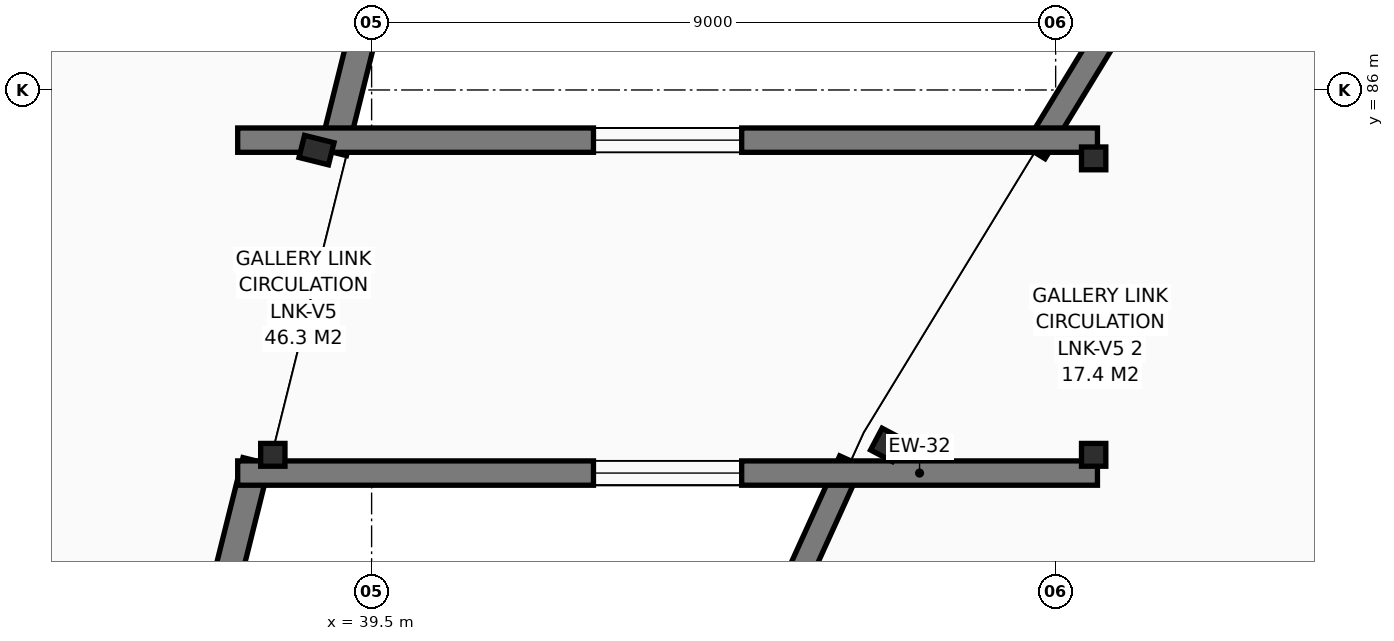
"""IFC4 building model, lengths in metres.
Left out: names, types, materials, properties, quantities, classifications, styles, units other than length and angle.
Written with IfcOpenShell. Run it as: python <this file> out.ifc"""

import sys

from ifc_helpers import new_model, si_unit, direction, frame, frame_2d, origin, origin_2d, place, context, subcontext, project, spatial, rectangle, hollow_circle, i_section, extrude, element, fill, save


model = new_model("IFC4")
c1 = context("Model", 3, precision=1e-05, world=origin(), true_north=direction((0.0, 1.0)))
c2 = subcontext(c1, "Body", "Model", "MODEL_VIEW")
j1 = project(units=[si_unit("LENGTHUNIT", "METRE"), si_unit("PLANEANGLEUNIT", "RADIAN")], contexts=[c1])
p1 = place(None, origin())
s1 = spatial("IfcSite", under=j1, at=p1, CompositionType="ELEMENT")
p2 = place(p1, origin())
s2 = spatial("IfcBuilding", under=s1, at=p2, CompositionType="ELEMENT")
p3 = place(p2, frame((0.0, 0.0, 5.1)))
s3 = spatial("IfcBuildingStorey", under=s2, at=p3, CompositionType="ELEMENT", Elevation=5.1)
p4 = place(p3, frame((46.284, 81.331, 0.0), z_axis=(0.0, 0.0, 1.0), x_axis=(0.883683947469, -0.468084053333, 0.0)))
e1 = element("IfcColumn", 1, at=p4, inside=s3, PredefinedType="COLUMN", context=c2, shape_type="SweptSolid", body=[
    extrude(hollow_circle(Radius=0.162, WallThickness=0.016, at=origin_2d()), origin(), (0.0, 0.0, 1.0), 4.42),
])
p5 = place(p3, frame((38.775, 85.209, 0.0), z_axis=(0.0, 0.0, 1.0), x_axis=(0.970295726276, -0.2419218956, 0.0)))
e2 = element("IfcColumn", 2, at=p5, inside=s3, PredefinedType="COLUMN", context=c2, shape_type="SweptSolid", body=[
    extrude(i_section(OverallWidth=0.3, OverallDepth=0.4, WebThickness=0.013, FlangeThickness=0.024, FilletRadius=0.027, at=origin_2d()), origin(), (0.0, 0.0, 1.0), 4.42),
])
for number, where, z_axis, x_axis in (
    (3, (38.2, 81.2, 0.0), (0.0, 0.0, 1.0), (1.0, 0.0, 0.0)),
    (4, (49.0, 81.2, 0.0), (0.0, 0.0, 1.0), (1.0, 0.0, 0.0)),
    (5, (49.0, 85.1, 0.0), (0.0, 0.0, 1.0), (1.0, 0.0, 0.0)),
):
    element("IfcColumn", number, at=place(p3, frame(where, z_axis=z_axis, x_axis=x_axis)), inside=s3, PredefinedType="COLUMN", context=c2, shape_type="SweptSolid", body=[
        extrude(i_section(OverallWidth=0.3, OverallDepth=0.32, WebThickness=0.011, FlangeThickness=0.021, FilletRadius=0.027, at=origin_2d()), origin(), (0.0, 0.0, 1.0), 4.42),
    ])
p6 = place(p3, frame((48.223, 85.18, 0.0), z_axis=(0.0, 0.0, 1.0), x_axis=(0.520931481082, 0.853598495792, 0.0)))
e6 = element("IfcWall", 6, at=p6, inside=s3, PredefinedType="SOLIDWALL", context=c2, shape_type="SweptSolid", body=[
    extrude(rectangle(XDim=2.572, YDim=0.32, at=frame_2d((1.286, 0.0))), origin(), (0.0, 0.0, 1.0), 4.18),
])
p7 = place(p3, frame((43.127, 75.222, 0.0), z_axis=(0.0, 0.0, 1.0), x_axis=(0.41336840626, 0.910563869647, 0.0)))
e7 = element("IfcWall", 7, at=p7, inside=s3, PredefinedType="SOLIDWALL", context=c2, shape_type="SweptSolid", body=[
    extrude(rectangle(XDim=6.477, YDim=0.32, at=frame_2d((3.239, 0.0))), origin(), (0.0, 0.0, 1.0), 4.18),
])
p8 = place(p3, frame((42.617, 99.71, 0.0), z_axis=(0.0, 0.0, 1.0), x_axis=(-0.241906463411, -0.970299573822, 0.0)))
e8 = element("IfcWall", 8, at=p8, inside=s3, PredefinedType="SOLIDWALL", context=c2, shape_type="SweptSolid", body=[
    extrude(rectangle(XDim=14.975, YDim=0.36, at=frame_2d((7.488, 0.0))), origin(), (0.0, 0.0, 1.0), 4.18),
])
p9 = place(p8, frame((1.6, 0.0, 0.85)))
e9 = element("IfcOpeningElement", 9, at=p9, cuts=e8, PredefinedType="OPENING", context=c2, shape_type="SweptSolid", body=[
    extrude(rectangle(XDim=1.5, YDim=1.7, at=frame_2d((0.75, 0.85))), frame((0.0, 0.19, 0.0), z_axis=(0.0, -1.0, 0.0), x_axis=(1.0, 0.0, 0.0)), (0.0, 0.0, 1.0), 0.38),
])
p10 = place(p3, frame((37.982, 81.12, 0.0), z_axis=(0.0, 0.0, 1.0), x_axis=(-0.241954977531, -0.970287477425, 0.0)))
e10 = element("IfcWall", 10, at=p10, inside=s3, PredefinedType="SOLIDWALL", context=c2, shape_type="SweptSolid", body=[
    extrude(rectangle(XDim=3.661, YDim=0.36, at=frame_2d((1.831, 0.0))), origin(), (0.0, 0.0, 1.0), 4.18),
])
p11 = place(p3, frame((37.271, 77.525, 0.0), z_axis=(0.0, 0.0, 1.0), x_axis=(-0.970297203556, 0.241915970475, 0.0)))
e11 = element("IfcWall", 11, at=p11, inside=s3, PredefinedType="SOLIDWALL", context=c2, shape_type="SweptSolid", body=[
    extrude(rectangle(XDim=32.82, YDim=0.36, at=frame_2d((16.41, 0.0))), origin(), (0.0, 0.0, 1.0), 4.18),
])
p12 = place(p11, frame((1.6, 0.0, 0.85)))
e12 = element("IfcOpeningElement", 12, at=p12, cuts=e11, PredefinedType="OPENING", context=c2, shape_type="SweptSolid", body=[
    extrude(rectangle(XDim=1.8, YDim=1.7, at=frame_2d((0.9, 0.85))), frame((0.0, 0.19, 0.0), z_axis=(0.0, -1.0, 0.0), x_axis=(1.0, 0.0, 0.0)), (0.0, 0.0, 1.0), 0.38),
])
p13 = place(p11, frame((13.448, 0.0, 0.85)))
e13 = element("IfcOpeningElement", 13, at=p13, cuts=e11, PredefinedType="OPENING", context=c2, shape_type="SweptSolid", body=[
    extrude(rectangle(XDim=1.95, YDim=1.5, at=frame_2d((0.975, 0.75))), frame((0.0, 0.19, 0.0), z_axis=(0.0, -1.0, 0.0), x_axis=(1.0, 0.0, 0.0)), (0.0, 0.0, 1.0), 0.38),
])
p14 = place(p11, frame((19.372, 0.0, 0.85)))
e14 = element("IfcOpeningElement", 14, at=p14, cuts=e11, PredefinedType="OPENING", context=c2, shape_type="SweptSolid", body=[
    extrude(rectangle(XDim=1.5, YDim=1.7, at=frame_2d((0.75, 0.85))), frame((0.0, 0.19, 0.0), z_axis=(0.0, -1.0, 0.0), x_axis=(1.0, 0.0, 0.0)), (0.0, 0.0, 1.0), 0.38),
])
p15 = place(p11, frame((25.296, 0.0, 0.85)))
e15 = element("IfcOpeningElement", 15, at=p15, cuts=e11, PredefinedType="OPENING", context=c2, shape_type="SweptSolid", body=[
    extrude(rectangle(XDim=1.8, YDim=1.7, at=frame_2d((0.9, 0.85))), frame((0.0, 0.19, 0.0), z_axis=(0.0, -1.0, 0.0), x_axis=(1.0, 0.0, 0.0)), (0.0, 0.0, 1.0), 0.38),
])
p16 = place(p3, frame((49.05, 80.96, 0.0), z_axis=(0.0, 0.0, 1.0), x_axis=(-1.0, 0.0, 0.0)))
e16 = element("IfcWall", 16, at=p16, inside=s3, PredefinedType="SOLIDWALL", context=c2, shape_type="SweptSolid", body=[
    extrude(rectangle(XDim=11.312, YDim=0.32, at=frame_2d((5.656, 0.0))), origin(), (0.0, 0.0, 1.0), 4.17),
])
p17 = place(p16, frame((4.681, 0.0, 1.12)))
e17 = element("IfcOpeningElement", 17, at=p17, cuts=e16, PredefinedType="OPENING", context=c2, shape_type="SweptSolid", body=[
    extrude(rectangle(XDim=1.95, YDim=1.5, at=frame_2d((0.975, 0.75))), frame((0.0, 0.17, 0.0), z_axis=(0.0, -1.0, 0.0), x_axis=(1.0, 0.0, 0.0)), (0.0, 0.0, 1.0), 0.34),
])
p18 = place(p3, frame((37.738, 85.34, 0.0), z_axis=(0.0, 0.0, 1.0), x_axis=(1.0, 0.0, 0.0)))
e18 = element("IfcWall", 18, at=p18, inside=s3, PredefinedType="SOLIDWALL", context=c2, shape_type="SweptSolid", body=[
    extrude(rectangle(XDim=11.312, YDim=0.32, at=frame_2d((5.656, 0.0))), origin(), (0.0, 0.0, 1.0), 4.17),
])
p19 = place(p18, frame((4.681, 0.0, 1.12)))
e19 = element("IfcOpeningElement", 19, at=p19, cuts=e18, PredefinedType="OPENING", context=c2, shape_type="SweptSolid", body=[
    extrude(rectangle(XDim=1.95, YDim=1.5, at=frame_2d((0.975, 0.75))), frame((0.0, 0.17, 0.0), z_axis=(0.0, -1.0, 0.0), x_axis=(1.0, 0.0, 0.0)), (0.0, 0.0, 1.0), 0.34),
])
p20 = place(p17, origin())
e20 = element("IfcWindow", 20, at=p20, inside=s3, PartitioningType="SINGLE_PANEL", PredefinedType="WINDOW", context=c2, shape_type="SweptSolid", body=[
    extrude(rectangle(XDim=1.95, YDim=1.5, at=frame_2d((0.975, 0.75))), frame((0.0, 0.03, 0.0), z_axis=(0.0, -1.0, 0.0), x_axis=(1.0, 0.0, 0.0)), (0.0, 0.0, 1.0), 0.06),
])
fill(e17, e20)
p21 = place(p19, origin())
e21 = element("IfcWindow", 21, at=p21, inside=s3, PartitioningType="SINGLE_PANEL", PredefinedType="WINDOW", context=c2, shape_type="SweptSolid", body=[
    extrude(rectangle(XDim=1.95, YDim=1.5, at=frame_2d((0.975, 0.75))), frame((0.0, 0.03, 0.0), z_axis=(0.0, -1.0, 0.0), x_axis=(1.0, 0.0, 0.0)), (0.0, 0.0, 1.0), 0.06),
])
fill(e19, e21)
save(model, sys.argv[1])
